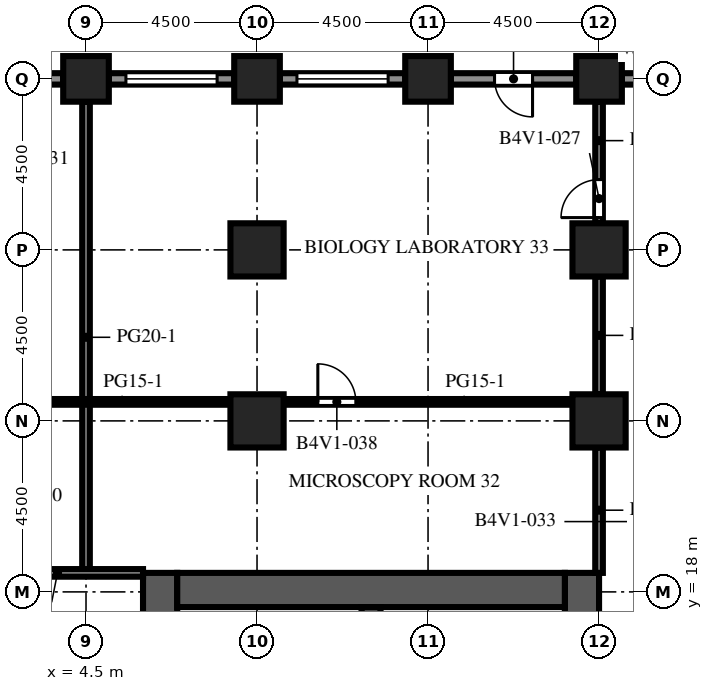
"""IFC4 building model, lengths in metres.
Left out: names, types, materials, properties, quantities, classifications, styles, units other than length and angle.
Written with IfcOpenShell. Run it as: python <this file> out.ifc"""

import sys

from ifc_helpers import new_model, si_unit, direction, frame, frame_2d, origin, origin_2d, place, context, subcontext, project, spatial, rectangle, extrude, element, fill, save


model = new_model("IFC4")
c1 = context("Model", 3, precision=1e-05, world=origin(), true_north=direction((0.0, 1.0)))
c2 = subcontext(c1, "Body", "Model", "MODEL_VIEW")
j1 = project(units=[si_unit("LENGTHUNIT", "METRE"), si_unit("PLANEANGLEUNIT", "RADIAN")], contexts=[c1])
p1 = place(None, origin())
s1 = spatial("IfcSite", under=j1, at=p1, CompositionType="ELEMENT")
p2 = place(p1, origin())
s2 = spatial("IfcBuilding", under=s1, at=p2, CompositionType="ELEMENT")
p3 = place(p2, frame((0.0, 0.0, 124.9)))
s3 = spatial("IfcBuildingStorey", under=s2, at=p3, CompositionType="ELEMENT", Elevation=124.9)
for number, where, z_axis, x_axis in (
    (1, (4.5, 31.5, 0.0), (0.0, 0.0, 1.0), (1.0, 0.0, 0.0)),
    (2, (9.0, 31.5, 0.0), (0.0, 0.0, 1.0), (1.0, 0.0, 0.0)),
    (3, (13.5, 31.5, 0.0), (0.0, 0.0, 1.0), (1.0, 0.0, 0.0)),
    (4, (18.0, 31.5, 0.0), (0.0, 0.0, 1.0), (1.0, 0.0, 0.0)),
):
    element("IfcColumn", number, at=place(p3, frame(where, z_axis=z_axis, x_axis=x_axis)), inside=s3, PredefinedType="COLUMN", context=c2, shape_type="SweptSolid", body=[
        extrude(rectangle(XDim=1.2, YDim=1.2, at=origin_2d()), origin(), (0.0, 0.0, 1.0), 4.1),
    ])
for number, where, z_axis, x_axis in (
    (5, (9.0, 22.5, 0.0), (0.0, 0.0, 1.0), (1.0, 0.0, 0.0)),
    (6, (9.0, 27.0, 0.0), (0.0, 0.0, 1.0), (1.0, 0.0, 0.0)),
    (7, (18.0, 22.5, 0.0), (0.0, 0.0, 1.0), (1.0, 0.0, 0.0)),
    (8, (18.0, 27.0, 0.0), (0.0, 0.0, 1.0), (1.0, 0.0, 0.0)),
):
    element("IfcColumn", number, at=place(p3, frame(where, z_axis=z_axis, x_axis=x_axis)), inside=s3, PredefinedType="COLUMN", context=c2, shape_type="SweptSolid", body=[
        extrude(rectangle(XDim=1.4, YDim=1.4, at=origin_2d()), origin(), (0.0, 0.0, 1.0), 4.1),
    ])
p4 = place(p3, frame((6.45, -9.0, 0.0), z_axis=(0.0, 0.0, 1.0), x_axis=(0.0, 1.0, 0.0)))
e9 = element("IfcWall", 9, at=p4, inside=s3, PredefinedType="SHEAR", context=c2, shape_type="SweptSolid", body=[
    extrude(rectangle(XDim=27.5, YDim=0.9, at=frame_2d((13.75, 0.0))), origin(), (0.0, 0.0, 1.0), 4.1),
])
p5 = place(p4, frame((12.55, 0.0, 0.0)))
e10 = element("IfcOpeningElement", 10, at=p5, cuts=e9, PredefinedType="OPENING", context=c2, shape_type="SweptSolid", body=[
    extrude(rectangle(XDim=2.4, YDim=2.4, at=frame_2d((1.2, 1.2))), frame((0.0, 0.46, 0.0), z_axis=(0.0, -1.0, 0.0), x_axis=(1.0, 0.0, 0.0)), (0.0, 0.0, 1.0), 0.92),
])
p6 = place(p4, frame((3.975, 0.0, 0.0)))
e11 = element("IfcOpeningElement", 11, at=p6, cuts=e9, PredefinedType="OPENING", context=c2, shape_type="SweptSolid", body=[
    extrude(rectangle(XDim=1.2, YDim=2.1, at=frame_2d((0.6, 1.05))), frame((0.0, 0.46, 0.0), z_axis=(0.0, -1.0, 0.0), x_axis=(1.0, 0.0, 0.0)), (0.0, 0.0, 1.0), 0.92),
])
p7 = place(p4, frame((22.325, 0.0, 0.0)))
e12 = element("IfcOpeningElement", 12, at=p7, cuts=e9, PredefinedType="OPENING", context=c2, shape_type="SweptSolid", body=[
    extrude(rectangle(XDim=1.2, YDim=2.1, at=frame_2d((0.6, 1.05))), frame((0.0, 0.46, 0.0), z_axis=(0.0, -1.0, 0.0), x_axis=(1.0, 0.0, 0.0)), (0.0, 0.0, 1.0), 0.92),
])
p8 = place(p3, frame((17.55, -9.0, 0.0), z_axis=(0.0, 0.0, 1.0), x_axis=(0.0, 1.0, 0.0)))
e13 = element("IfcWall", 13, at=p8, inside=s3, PredefinedType="SHEAR", context=c2, shape_type="SweptSolid", body=[
    extrude(rectangle(XDim=27.5, YDim=0.9, at=frame_2d((13.75, 0.0))), origin(), (0.0, 0.0, 1.0), 4.1),
])
p9 = place(p8, frame((12.55, 0.0, 0.0)))
e14 = element("IfcOpeningElement", 14, at=p9, cuts=e13, PredefinedType="OPENING", context=c2, shape_type="SweptSolid", body=[
    extrude(rectangle(XDim=2.4, YDim=2.4, at=frame_2d((1.2, 1.2))), frame((0.0, 0.46, 0.0), z_axis=(0.0, -1.0, 0.0), x_axis=(1.0, 0.0, 0.0)), (0.0, 0.0, 1.0), 0.92),
])
p10 = place(p8, frame((6.825, 0.0, 0.0)))
e15 = element("IfcOpeningElement", 15, at=p10, cuts=e13, PredefinedType="OPENING", context=c2, shape_type="SweptSolid", body=[
    extrude(rectangle(XDim=1.2, YDim=2.1, at=frame_2d((0.6, 1.05))), frame((0.0, 0.46, 0.0), z_axis=(0.0, -1.0, 0.0), x_axis=(1.0, 0.0, 0.0)), (0.0, 0.0, 1.0), 0.92),
])
p11 = place(p8, frame((19.475, 0.0, 0.0)))
e16 = element("IfcOpeningElement", 16, at=p11, cuts=e13, PredefinedType="OPENING", context=c2, shape_type="SweptSolid", body=[
    extrude(rectangle(XDim=1.2, YDim=2.1, at=frame_2d((0.6, 1.05))), frame((0.0, 0.46, 0.0), z_axis=(0.0, -1.0, 0.0), x_axis=(1.0, 0.0, 0.0)), (0.0, 0.0, 1.0), 0.92),
])
p12 = place(p3, frame((6.9, 18.05, 0.0), z_axis=(0.0, 0.0, 1.0), x_axis=(1.0, 0.0, 0.0)))
e17 = element("IfcWall", 17, at=p12, inside=s3, PredefinedType="SHEAR", context=c2, shape_type="SweptSolid", body=[
    extrude(rectangle(XDim=10.2, YDim=0.9, at=frame_2d((5.1, 0.0))), origin(), (0.0, 0.0, 1.0), 4.1),
])
p13 = place(p3, frame((12.0, 10.25, 0.0), z_axis=(0.0, 0.0, 1.0), x_axis=(0.0, 1.0, 0.0)))
e18 = element("IfcWall", 18, at=p13, inside=s3, PredefinedType="SHEAR", context=c2, shape_type="SweptSolid", body=[
    extrude(rectangle(XDim=7.35, YDim=0.5, at=frame_2d((3.675, 0.0))), origin(), (0.0, 0.0, 1.0), 4.1),
])
p14 = place(p3, frame((18.6, 31.5, 0.0), z_axis=(0.0, 0.0, 1.0), x_axis=(1.0, 0.0, 0.0)))
e19 = element("IfcWall", 19, at=p14, inside=s3, PredefinedType="SOLIDWALL", context=c2, shape_type="SweptSolid", body=[
    extrude(rectangle(XDim=3.3, YDim=0.3, at=frame_2d((1.65, 0.0))), origin(), (0.0, 0.0, 1.0), 2.75),
])
p15 = place(p14, frame((0.525, 0.0, 0.8)))
e20 = element("IfcOpeningElement", 20, at=p15, cuts=e19, PredefinedType="OPENING", context=c2, shape_type="SweptSolid", body=[
    extrude(rectangle(XDim=1.2, YDim=1.7, at=frame_2d((0.6, 0.85))), frame((0.0, 0.16, 0.0), z_axis=(0.0, -1.0, 0.0), x_axis=(1.0, 0.0, 0.0)), (0.0, 0.0, 1.0), 0.32),
])
p16 = place(p3, frame((14.1, 31.5, 0.0), z_axis=(0.0, 0.0, 1.0), x_axis=(1.0, 0.0, 0.0)))
e21 = element("IfcWall", 21, at=p16, inside=s3, PredefinedType="SOLIDWALL", context=c2, shape_type="SweptSolid", body=[
    extrude(rectangle(XDim=3.3, YDim=0.3, at=frame_2d((1.65, 0.0))), origin(), (0.0, 0.0, 1.0), 2.75),
])
p17 = place(p16, frame((1.15, 0.0, 0.0)))
e22 = element("IfcOpeningElement", 22, at=p17, cuts=e21, PredefinedType="OPENING", context=c2, shape_type="SweptSolid", body=[
    extrude(rectangle(XDim=1.0, YDim=2.2, at=frame_2d((0.5, 1.1))), frame((0.0, 0.16, 0.0), z_axis=(0.0, -1.0, 0.0), x_axis=(1.0, 0.0, 0.0)), (0.0, 0.0, 1.0), 0.32),
])
p18 = place(p3, frame((9.6, 31.5, 0.0), z_axis=(0.0, 0.0, 1.0), x_axis=(1.0, 0.0, 0.0)))
e23 = element("IfcWall", 23, at=p18, inside=s3, PredefinedType="SOLIDWALL", context=c2, shape_type="SweptSolid", body=[
    extrude(rectangle(XDim=3.3, YDim=0.3, at=frame_2d((1.65, 0.0))), origin(), (0.0, 0.0, 1.0), 2.75),
])
p19 = place(p18, frame((0.45, 0.0, 0.8)))
e24 = element("IfcOpeningElement", 24, at=p19, cuts=e23, PredefinedType="OPENING", context=c2, shape_type="SweptSolid", body=[
    extrude(rectangle(XDim=2.4, YDim=1.7, at=frame_2d((1.2, 0.85))), frame((0.0, 0.16, 0.0), z_axis=(0.0, -1.0, 0.0), x_axis=(1.0, 0.0, 0.0)), (0.0, 0.0, 1.0), 0.32),
])
p20 = place(p3, frame((5.1, 31.5, 0.0), z_axis=(0.0, 0.0, 1.0), x_axis=(1.0, 0.0, 0.0)))
e25 = element("IfcWall", 25, at=p20, inside=s3, PredefinedType="SOLIDWALL", context=c2, shape_type="SweptSolid", body=[
    extrude(rectangle(XDim=3.3, YDim=0.3, at=frame_2d((1.65, 0.0))), origin(), (0.0, 0.0, 1.0), 2.75),
])
p21 = place(p20, frame((0.45, 0.0, 0.8)))
e26 = element("IfcOpeningElement", 26, at=p21, cuts=e25, PredefinedType="OPENING", context=c2, shape_type="SweptSolid", body=[
    extrude(rectangle(XDim=2.4, YDim=1.7, at=frame_2d((1.2, 0.85))), frame((0.0, 0.16, 0.0), z_axis=(0.0, -1.0, 0.0), x_axis=(1.0, 0.0, 0.0)), (0.0, 0.0, 1.0), 0.32),
])
p22 = place(p3, frame((0.6, 31.5, 0.0), z_axis=(0.0, 0.0, 1.0), x_axis=(1.0, 0.0, 0.0)))
e27 = element("IfcWall", 27, at=p22, inside=s3, PredefinedType="SOLIDWALL", context=c2, shape_type="SweptSolid", body=[
    extrude(rectangle(XDim=3.3, YDim=0.3, at=frame_2d((1.65, 0.0))), origin(), (0.0, 0.0, 1.0), 2.75),
])
p23 = place(p22, frame((0.45, 0.0, 0.8)))
e28 = element("IfcOpeningElement", 28, at=p23, cuts=e27, PredefinedType="OPENING", context=c2, shape_type="SweptSolid", body=[
    extrude(rectangle(XDim=2.4, YDim=1.7, at=frame_2d((1.2, 0.85))), frame((0.0, 0.16, 0.0), z_axis=(0.0, -1.0, 0.0), x_axis=(1.0, 0.0, 0.0)), (0.0, 0.0, 1.0), 0.32),
])
p24 = place(p3, frame((8.3, 14.807, 0.0), z_axis=(0.0, 0.0, 1.0), x_axis=(0.0, 1.0, 0.0)))
e29 = element("IfcWall", 29, at=p24, inside=s3, PredefinedType="PARTITIONING", context=c2, shape_type="SweptSolid", body=[
    extrude(rectangle(XDim=2.793, YDim=0.1, at=frame_2d((1.396, 0.0))), origin(), (0.0, 0.0, 1.0), 3.65),
])
p25 = place(p24, frame((0.896, 0.0, 0.0)))
e30 = element("IfcOpeningElement", 30, at=p25, cuts=e29, PredefinedType="OPENING", context=c2, shape_type="SweptSolid", body=[
    extrude(rectangle(XDim=1.0, YDim=2.1, at=frame_2d((0.5, 1.05))), frame((0.0, 0.06, 0.0), z_axis=(0.0, -1.0, 0.0), x_axis=(1.0, 0.0, 0.0)), (0.0, 0.0, 1.0), 0.12),
])
p26 = place(p3, frame((4.5, 18.5, 0.0), z_axis=(0.0, 0.0, 1.0), x_axis=(0.0, 1.0, 0.0)))
e31 = element("IfcWall", 31, at=p26, inside=s3, PredefinedType="PARTITIONING", context=c2, shape_type="SweptSolid", body=[
    extrude(rectangle(XDim=12.4, YDim=0.2, at=frame_2d((6.2, 0.0))), origin(), (0.0, 0.0, 1.0), 3.65),
])
p27 = place(p3, frame((18.0, 18.5, 0.0), z_axis=(0.0, 0.0, 1.0), x_axis=(0.0, 1.0, 0.0)))
e32 = element("IfcWall", 32, at=p27, inside=s3, PredefinedType="PARTITIONING", context=c2, shape_type="SweptSolid", body=[
    extrude(rectangle(XDim=3.3, YDim=0.2, at=frame_2d((1.65, 0.0))), origin(), (0.0, 0.0, 1.0), 3.65),
])
p28 = place(p3, frame((18.0, 23.2, 0.0), z_axis=(0.0, 0.0, 1.0), x_axis=(0.0, 1.0, 0.0)))
e33 = element("IfcWall", 33, at=p28, inside=s3, PredefinedType="PARTITIONING", context=c2, shape_type="SweptSolid", body=[
    extrude(rectangle(XDim=3.1, YDim=0.2, at=frame_2d((1.55, 0.0))), origin(), (0.0, 0.0, 1.0), 3.65),
])
p29 = place(p3, frame((18.0, 27.7, 0.0), z_axis=(0.0, 0.0, 1.0), x_axis=(0.0, 1.0, 0.0)))
e34 = element("IfcWall", 34, at=p29, inside=s3, PredefinedType="PARTITIONING", context=c2, shape_type="SweptSolid", body=[
    extrude(rectangle(XDim=3.2, YDim=0.2, at=frame_2d((1.6, 0.0))), origin(), (0.0, 0.0, 1.0), 3.65),
])
p30 = place(p29, frame((0.15, 0.0, 0.0)))
e35 = element("IfcOpeningElement", 35, at=p30, cuts=e34, PredefinedType="OPENING", context=c2, shape_type="SweptSolid", body=[
    extrude(rectangle(XDim=1.0, YDim=2.1, at=frame_2d((0.5, 1.05))), frame((0.0, 0.11, 0.0), z_axis=(0.0, -1.0, 0.0), x_axis=(1.0, 0.0, 0.0)), (0.0, 0.0, 1.0), 0.22),
])
p31 = place(p3, frame((1.5, 18.5, 0.0), z_axis=(0.0, 0.0, 1.0), x_axis=(1.0, 0.0, 0.0)))
e36 = element("IfcWall", 36, at=p31, inside=s3, PredefinedType="PARTITIONING", context=c2, shape_type="SweptSolid", body=[
    extrude(rectangle(XDim=4.5, YDim=0.2, at=frame_2d((2.25, 0.0))), origin(), (0.0, 0.0, 1.0), 3.65),
])
p32 = place(p3, frame((8.3, 23.0, 0.0), z_axis=(0.0, 0.0, 1.0), x_axis=(-1.0, 0.0, 0.0)))
e37 = element("IfcWall", 37, at=p32, inside=s3, PredefinedType="PARTITIONING", context=c2, shape_type="SweptSolid", body=[
    extrude(rectangle(XDim=7.6, YDim=0.15, at=frame_2d((3.8, 0.0))), origin(), (0.0, 0.0, 1.0), 3.65),
])
p33 = place(p32, frame((5.7, 0.0, 0.0)))
e38 = element("IfcOpeningElement", 38, at=p33, cuts=e37, PredefinedType="OPENING", context=c2, shape_type="SweptSolid", body=[
    extrude(rectangle(XDim=1.0, YDim=2.1, at=frame_2d((0.5, 1.05))), frame((0.0, 0.085, 0.0), z_axis=(0.0, -1.0, 0.0), x_axis=(1.0, 0.0, 0.0)), (0.0, 0.0, 1.0), 0.17),
])
p34 = place(p3, frame((17.3, 23.0, 0.0), z_axis=(0.0, 0.0, 1.0), x_axis=(-1.0, 0.0, 0.0)))
e39 = element("IfcWall", 39, at=p34, inside=s3, PredefinedType="PARTITIONING", context=c2, shape_type="SweptSolid", body=[
    extrude(rectangle(XDim=7.6, YDim=0.15, at=frame_2d((3.8, 0.0))), origin(), (0.0, 0.0, 1.0), 3.65),
])
p35 = place(p34, frame((5.7, 0.0, 0.0)))
e40 = element("IfcOpeningElement", 40, at=p35, cuts=e39, PredefinedType="OPENING", context=c2, shape_type="SweptSolid", body=[
    extrude(rectangle(XDim=1.0, YDim=2.1, at=frame_2d((0.5, 1.05))), frame((0.0, 0.085, 0.0), z_axis=(0.0, -1.0, 0.0), x_axis=(1.0, 0.0, 0.0)), (0.0, 0.0, 1.0), 0.17),
])
p36 = place(p17, origin())
e41 = element("IfcDoor", 41, at=p36, inside=s3, OperationType="SINGLE_SWING_RIGHT", PredefinedType="DOOR", context=c2, shape_type="SweptSolid", body=[
    extrude(rectangle(XDim=1.0, YDim=2.2, at=frame_2d((0.5, 1.1))), frame((0.0, 0.025, 0.0), z_axis=(0.0, -1.0, 0.0), x_axis=(1.0, 0.0, 0.0)), (0.0, 0.0, 1.0), 0.05),
])
fill(e22, e41)
p37 = place(p19, origin())
e42 = element("IfcWindow", 42, at=p37, inside=s3, PartitioningType="SINGLE_PANEL", PredefinedType="WINDOW", context=c2, shape_type="SweptSolid", body=[
    extrude(rectangle(XDim=2.4, YDim=1.7, at=frame_2d((1.2, 0.85))), frame((0.0, 0.03, 0.0), z_axis=(0.0, -1.0, 0.0), x_axis=(1.0, 0.0, 0.0)), (0.0, 0.0, 1.0), 0.06),
])
fill(e24, e42)
p38 = place(p21, origin())
e43 = element("IfcWindow", 43, at=p38, inside=s3, PartitioningType="SINGLE_PANEL", PredefinedType="WINDOW", context=c2, shape_type="SweptSolid", body=[
    extrude(rectangle(XDim=2.4, YDim=1.7, at=frame_2d((1.2, 0.85))), frame((0.0, 0.03, 0.0), z_axis=(0.0, -1.0, 0.0), x_axis=(1.0, 0.0, 0.0)), (0.0, 0.0, 1.0), 0.06),
])
fill(e26, e43)
p39 = place(p30, origin())
e44 = element("IfcDoor", 44, at=p39, inside=s3, OperationType="SINGLE_SWING_LEFT", PredefinedType="DOOR", context=c2, shape_type="SweptSolid", body=[
    extrude(rectangle(XDim=1.0, YDim=2.1, at=frame_2d((0.5, 1.05))), frame((0.0, 0.025, 0.0), z_axis=(0.0, -1.0, 0.0), x_axis=(1.0, 0.0, 0.0)), (0.0, 0.0, 1.0), 0.05),
])
fill(e35, e44)
p40 = place(p35, origin())
e45 = element("IfcDoor", 45, at=p40, inside=s3, OperationType="SINGLE_SWING_RIGHT", PredefinedType="DOOR", context=c2, shape_type="SweptSolid", body=[
    extrude(rectangle(XDim=1.0, YDim=2.1, at=frame_2d((0.5, 1.05))), frame((0.0, 0.025, 0.0), z_axis=(0.0, -1.0, 0.0), x_axis=(1.0, 0.0, 0.0)), (0.0, 0.0, 1.0), 0.05),
])
fill(e40, e45)
save(model, sys.argv[1])
